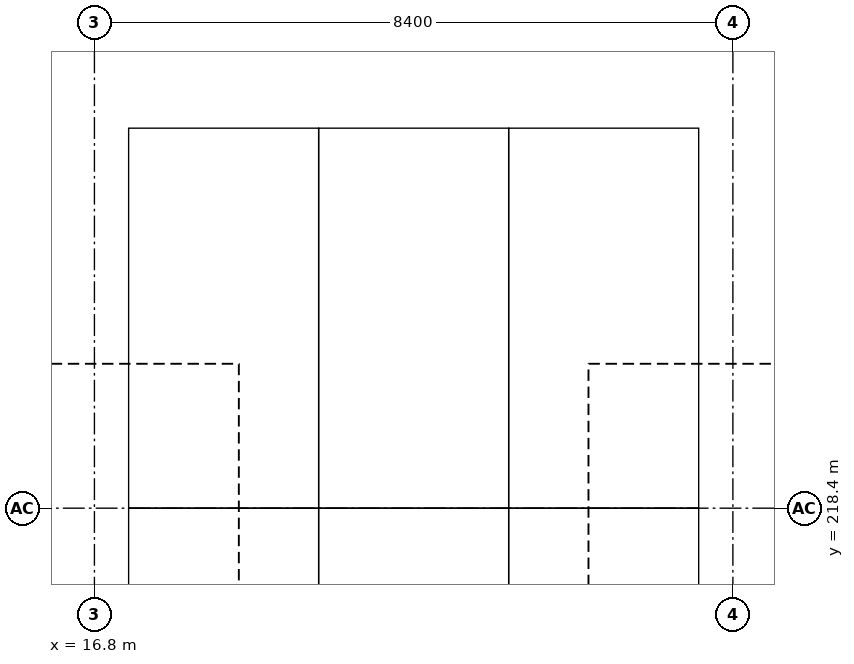
"""IFC4 building model, lengths in metres.
Left out: names, types, materials, properties, quantities, classifications, styles, units other than length and angle.
Written with IfcOpenShell. Run it as: python <this file> out.ifc"""

import sys

from ifc_helpers import new_model, si_unit, direction, frame, origin, origin_2d, place, context, subcontext, project, spatial, rectangle, extrude, element, save


model = new_model("IFC4")
c1 = context("Model", 3, precision=1e-05, world=origin(), true_north=direction((0.0, 1.0)))
c2 = subcontext(c1, "Body", "Model", "MODEL_VIEW")
j1 = project(units=[si_unit("LENGTHUNIT", "METRE"), si_unit("PLANEANGLEUNIT", "RADIAN")], contexts=[c1])
p1 = place(None, origin())
s1 = spatial("IfcSite", under=j1, at=p1, CompositionType="ELEMENT")
p2 = place(p1, origin())
s2 = spatial("IfcBuilding", under=s1, at=p2, CompositionType="ELEMENT")
p3 = place(p2, frame((0.0, 0.0, -3.0)))
s3 = spatial("IfcBuildingStorey", under=s2, at=p3, CompositionType="ELEMENT", Elevation=-3.0)
for number, where, z_axis, x_axis in (
    (1, (16.8, 218.4, 0.0), (0.0, 0.0, 1.0), (1.0, 0.0, 0.0)),
    (2, (25.2, 218.4, 0.0), (0.0, 0.0, 1.0), (1.0, 0.0, 0.0)),
):
    element("IfcColumn", number, at=place(p3, frame(where, z_axis=z_axis, x_axis=x_axis)), inside=s3, PredefinedType="COLUMN", context=c2, shape_type="SweptSolid", body=[
        extrude(rectangle(XDim=0.8, YDim=0.8, at=origin_2d()), origin(), (0.0, 0.0, 1.0), 2.4),
    ])
save(model, sys.argv[1])
